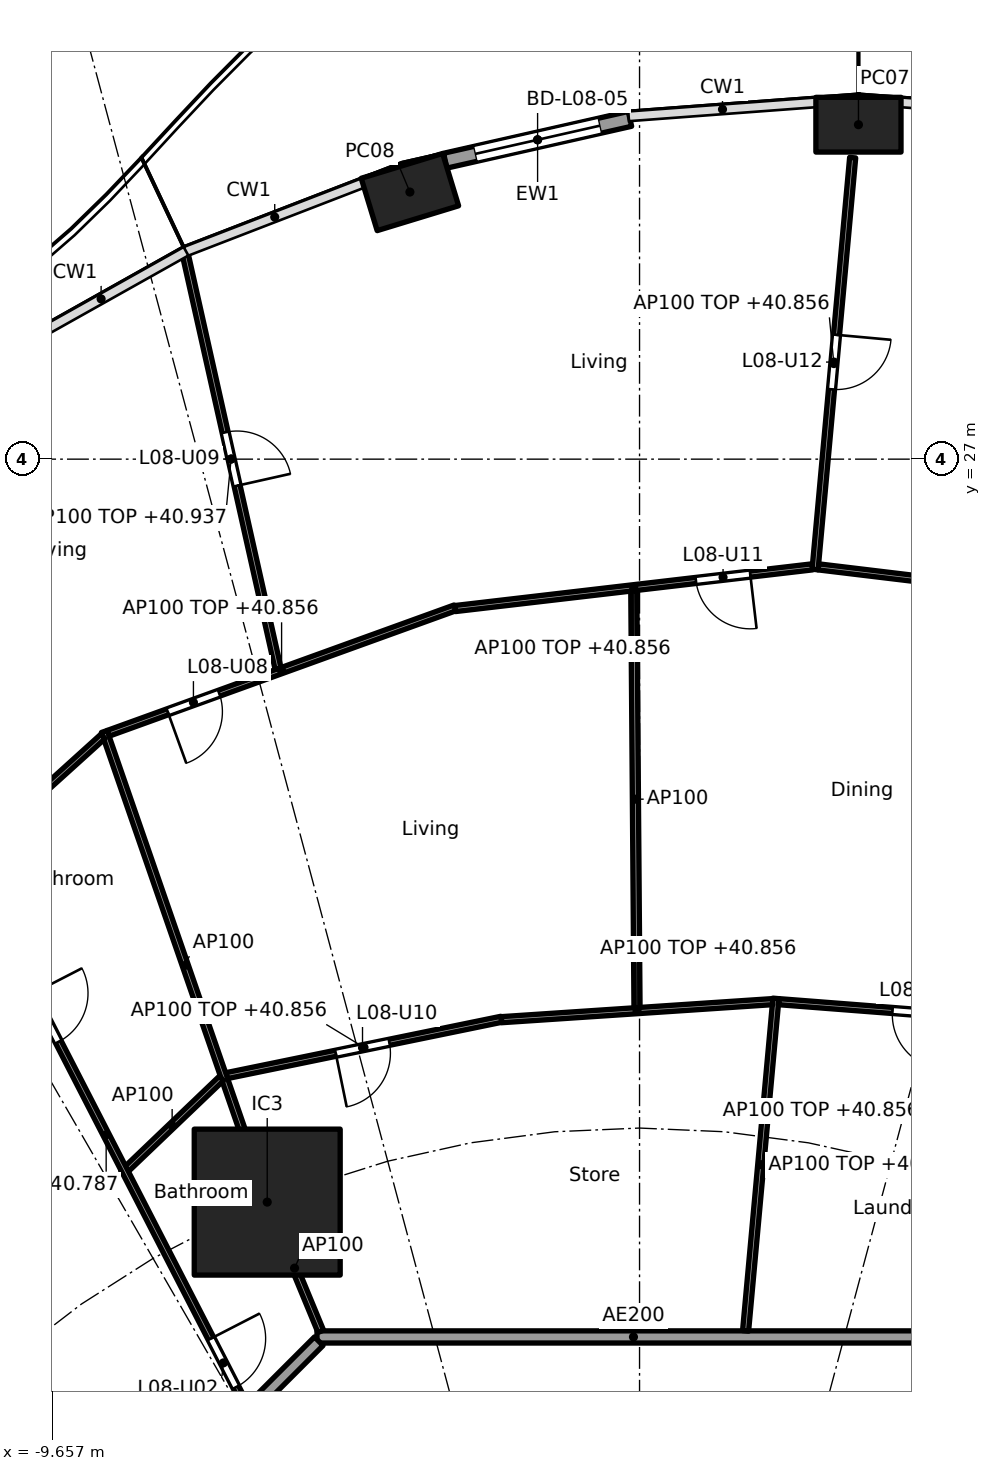
"""IFC4 building model, lengths in metres.
Left out: names, types, materials, properties, quantities, classifications, styles, units other than length and angle.
Written with IfcOpenShell. Run it as: python <this file> out.ifc"""

import sys

from ifc_helpers import new_model, si_unit, direction, frame, frame_2d, origin, origin_2d, place, context, subcontext, project, spatial, rectangle, hollow_rectangle, extrude, element, fill, save


model = new_model("IFC4")
c1 = context("Model", 3, precision=1e-05, world=origin(), true_north=direction((0.0, 1.0)))
c2 = subcontext(c1, "Body", "Model", "MODEL_VIEW")
j1 = project(units=[si_unit("LENGTHUNIT", "METRE"), si_unit("PLANEANGLEUNIT", "RADIAN")], contexts=[c1])
p1 = place(None, origin())
s1 = spatial("IfcSite", under=j1, at=p1, CompositionType="ELEMENT")
p2 = place(p1, origin())
s2 = spatial("IfcBuilding", under=s1, at=p2, CompositionType="ELEMENT")
p3 = place(p2, frame((0.0, 0.0, 38.1)))
s3 = spatial("IfcBuildingStorey", under=s2, at=p3, CompositionType="ELEMENT", Elevation=38.1)
for number, where, z_axis, x_axis in (
    (1, (3.6, 32.5, 0.0), (0.0, 0.0, 1.0), (-1.0, 0.0, 0.0)),
    (2, (-3.776, 31.393, 0.0), (0.0, 0.0, 1.0), (-0.957, -0.292, 0.0)),
):
    element("IfcColumn", number, at=place(p3, frame(where, z_axis=z_axis, x_axis=x_axis)), inside=s3, PredefinedType="COLUMN", context=c2, shape_type="SweptSolid", body=[
        extrude(hollow_rectangle(XDim=1.4, YDim=0.9, WallThickness=0.05, at=origin_2d()), origin(), (0.0, 0.0, 1.0), 3.7),
    ])
p4 = place(p3, frame((-6.123, 14.782, 0.0), z_axis=(0.0, 0.0, 1.0), x_axis=(1.0, 0.0, 0.0)))
e3 = element("IfcColumn", 3, at=p4, inside=s3, PredefinedType="COLUMN", context=c2, shape_type="SweptSolid", body=[
    extrude(rectangle(XDim=2.4, YDim=2.4, at=origin_2d()), origin(), (0.0, 0.0, 1.0), 3.7),
])
p5 = place(p3, frame((-3.195, 31.908, 0.0), z_axis=(0.0, 0.0, 1.0), x_axis=(0.975331134677, 0.220746863466, 0.0)))
e4 = element("IfcWall", 4, at=p5, inside=s3, PredefinedType="SOLIDWALL", context=c2, shape_type="SweptSolid", body=[
    extrude(rectangle(XDim=3.115, YDim=0.25, at=frame_2d((1.557, 0.0))), origin(), (0.0, 0.0, 1.0), 3.44),
])
p6 = place(p5, frame((0.507, 0.0, 0.0)))
e5 = element("IfcOpeningElement", 5, at=p6, cuts=e4, PredefinedType="OPENING", context=c2, shape_type="SweptSolid", body=[
    extrude(rectangle(XDim=2.1, YDim=2.4, at=frame_2d((1.05, 1.2))), frame((0.0, 0.135, 0.0), z_axis=(0.0, -1.0, 0.0), x_axis=(1.0, 0.0, 0.0)), (0.0, 0.0, 1.0), 0.27),
])
p7 = place(p3, frame((5.104, 12.565, 0.0), z_axis=(0.0, 0.0, 1.0), x_axis=(-1.0, 0.0, 0.0)))
e6 = element("IfcWall", 6, at=p7, inside=s3, PredefinedType="PARTITIONING", context=c2, shape_type="SweptSolid", body=[
    extrude(rectangle(XDim=10.409, YDim=0.2, at=frame_2d((5.205, 0.0))), origin(), (0.0, 0.0, 1.0), 3.44),
])
p8 = place(p3, frame((-5.275, 12.494, 0.0), z_axis=(0.0, 0.0, 1.0), x_axis=(-0.707106781187, -0.707106781187, 0.0)))
e7 = element("IfcWall", 7, at=p8, inside=s3, PredefinedType="PARTITIONING", context=c2, shape_type="SweptSolid", body=[
    extrude(rectangle(XDim=10.209, YDim=0.2, at=frame_2d((5.104, 0.0))), origin(), (0.0, 0.0, 1.0), 3.44),
])
p9 = place(p8, frame((2.87, 0.0, 0.0)))
e8 = element("IfcOpeningElement", 8, at=p9, cuts=e7, PredefinedType="OPENING", context=c2, shape_type="SweptSolid", body=[
    extrude(rectangle(XDim=1.0, YDim=2.1, at=frame_2d((0.5, 1.05))), frame((0.0, 0.11, 0.0), z_axis=(0.0, -1.0, 0.0), x_axis=(1.0, 0.0, 0.0)), (0.0, 0.0, 1.0), 0.22),
])
p10 = place(p3, frame((6.928, 17.719, 0.0), z_axis=(0.0, 0.0, 1.0), x_axis=(-0.997017959142, 0.077169872028, 0.0)))
e9 = element("IfcWall", 9, at=p10, inside=s3, PredefinedType="PARTITIONING", context=c2, shape_type="SweptSolid", body=[
    extrude(rectangle(XDim=4.654, YDim=0.1, at=frame_2d((2.327, 0.0))), origin(), (0.0, 0.0, 1.0), 2.756),
])
p11 = place(p10, frame((1.877, 0.0, 0.0)))
e10 = element("IfcOpeningElement", 10, at=p11, cuts=e9, PredefinedType="OPENING", context=c2, shape_type="SweptSolid", body=[
    extrude(rectangle(XDim=0.9, YDim=2.1, at=frame_2d((0.45, 1.05))), frame((0.0, 0.06, 0.0), z_axis=(0.0, -1.0, 0.0), x_axis=(1.0, 0.0, 0.0)), (0.0, 0.0, 1.0), 0.12),
])
p12 = place(p3, frame((8.907, 24.51, 0.0), z_axis=(0.0, 0.0, 1.0), x_axis=(-0.992836798252, 0.119478416615, 0.0)))
e11 = element("IfcWall", 11, at=p12, inside=s3, PredefinedType="PARTITIONING", context=c2, shape_type="SweptSolid", body=[
    extrude(rectangle(XDim=6.01, YDim=0.1, at=frame_2d((3.005, 0.0))), origin(), (0.0, 0.0, 1.0), 2.756),
])
p13 = place(p3, frame((1.744, 12.664, 0.0), z_axis=(0.0, 0.0, 1.0), x_axis=(0.090888552747, 0.995861070119, 0.0)))
e12 = element("IfcWall", 12, at=p13, inside=s3, PredefinedType="PARTITIONING", context=c2, shape_type="SweptSolid", body=[
    extrude(rectangle(XDim=5.49, YDim=0.1, at=frame_2d((2.745, 0.0))), origin(), (0.0, 0.0, 1.0), 2.687),
])
p14 = place(p3, frame((2.188, 18.079, 0.0), z_axis=(0.0, 0.0, 1.0), x_axis=(-0.997791437766, -0.066424744789, 0.0)))
e13 = element("IfcWall", 13, at=p14, inside=s3, PredefinedType="PARTITIONING", context=c2, shape_type="SweptSolid", body=[
    extrude(rectangle(XDim=4.469, YDim=0.1, at=frame_2d((2.235, 0.0))), origin(), (0.0, 0.0, 1.0), 2.756),
])
p15 = place(p3, frame((2.887, 25.185, 0.0), z_axis=(0.0, 0.0, 1.0), x_axis=(0.090885272046, 0.995861369531, 0.0)))
e14 = element("IfcWall", 14, at=p15, inside=s3, PredefinedType="PARTITIONING", context=c2, shape_type="SweptSolid", body=[
    extrude(rectangle(XDim=6.802, YDim=0.1, at=frame_2d((3.401, 0.0))), origin(), (0.0, 0.0, 1.0), 2.756),
])
p16 = place(p15, frame((2.976, 0.0, 0.0)))
e15 = element("IfcOpeningElement", 15, at=p16, cuts=e14, PredefinedType="OPENING", context=c2, shape_type="SweptSolid", body=[
    extrude(rectangle(XDim=0.9, YDim=2.1, at=frame_2d((0.45, 1.05))), frame((0.0, 0.06, 0.0), z_axis=(0.0, -1.0, 0.0), x_axis=(1.0, 0.0, 0.0)), (0.0, 0.0, 1.0), 0.12),
])
p17 = place(p3, frame((2.842, 25.229, 0.0), z_axis=(0.0, 0.0, 1.0), x_axis=(-0.993255612046, -0.115945198862, 0.0)))
e16 = element("IfcWall", 16, at=p17, inside=s3, PredefinedType="PARTITIONING", context=c2, shape_type="SweptSolid", body=[
    extrude(rectangle(XDim=5.913, YDim=0.1, at=frame_2d((2.956, 0.0))), origin(), (0.0, 0.0, 1.0), 2.756),
])
p18 = place(p17, frame((1.028, 0.0, 0.0)))
e17 = element("IfcOpeningElement", 17, at=p18, cuts=e16, PredefinedType="OPENING", context=c2, shape_type="SweptSolid", body=[
    extrude(rectangle(XDim=0.9, YDim=2.1, at=frame_2d((0.45, 1.05))), frame((0.0, 0.06, 0.0), z_axis=(0.0, -1.0, 0.0), x_axis=(1.0, 0.0, 0.0)), (0.0, 0.0, 1.0), 0.12),
])
p19 = place(p3, frame((-0.042, 17.98, 0.0), z_axis=(0.0, 0.0, 1.0), x_axis=(-0.007692080119, 0.999970415514, 0.0)))
e18 = element("IfcWall", 18, at=p19, inside=s3, PredefinedType="PARTITIONING", context=c2, shape_type="SweptSolid", body=[
    extrude(rectangle(XDim=6.856, YDim=0.1, at=frame_2d((3.428, 0.0))), origin(), (0.0, 0.0, 1.0), 3.44),
])
p20 = place(p3, frame((-2.272, 17.789, 0.0), z_axis=(0.0, 0.0, 1.0), x_axis=(-0.979587203416, -0.2010196779, 0.0)))
e19 = element("IfcWall", 19, at=p20, inside=s3, PredefinedType="PARTITIONING", context=c2, shape_type="SweptSolid", body=[
    extrude(rectangle(XDim=4.613, YDim=0.1, at=frame_2d((2.306, 0.0))), origin(), (0.0, 0.0, 1.0), 2.756),
])
p21 = place(p20, frame((1.881, 0.0, 0.0)))
e20 = element("IfcOpeningElement", 20, at=p21, cuts=e19, PredefinedType="OPENING", context=c2, shape_type="SweptSolid", body=[
    extrude(rectangle(XDim=0.9, YDim=2.1, at=frame_2d((0.45, 1.05))), frame((0.0, 0.06, 0.0), z_axis=(0.0, -1.0, 0.0), x_axis=(1.0, 0.0, 0.0)), (0.0, 0.0, 1.0), 0.12),
])
p22 = place(p3, frame((-3.034, 24.554, 0.0), z_axis=(0.0, 0.0, 1.0), x_axis=(-0.940401691072, -0.340065669288, 0.0)))
e21 = element("IfcWall", 21, at=p22, inside=s3, PredefinedType="PARTITIONING", context=c2, shape_type="SweptSolid", body=[
    extrude(rectangle(XDim=6.067, YDim=0.1, at=frame_2d((3.034, 0.0))), origin(), (0.0, 0.0, 1.0), 2.756),
])
p23 = place(p22, frame((4.125, 0.0, 0.0)))
e22 = element("IfcOpeningElement", 22, at=p23, cuts=e21, PredefinedType="OPENING", context=c2, shape_type="SweptSolid", body=[
    extrude(rectangle(XDim=0.9, YDim=2.1, at=frame_2d((0.45, 1.05))), frame((0.0, 0.06, 0.0), z_axis=(0.0, -1.0, 0.0), x_axis=(1.0, 0.0, 0.0)), (0.0, 0.0, 1.0), 0.12),
])
p24 = place(p3, frame((-5.945, 23.555, 0.0), z_axis=(0.0, 0.0, 1.0), x_axis=(-0.218598565433, 0.975814873421, 0.0)))
e23 = element("IfcWall", 23, at=p24, inside=s3, PredefinedType="PARTITIONING", context=c2, shape_type="SweptSolid", body=[
    extrude(rectangle(XDim=7.065, YDim=0.1, at=frame_2d((3.533, 0.0))), origin(), (0.0, 0.0, 1.0), 2.837),
])
p25 = place(p24, frame((3.083, 0.0, 0.0)))
e24 = element("IfcOpeningElement", 24, at=p25, cuts=e23, PredefinedType="OPENING", context=c2, shape_type="SweptSolid", body=[
    extrude(rectangle(XDim=0.9, YDim=2.1, at=frame_2d((0.45, 1.05))), frame((0.0, 0.06, 0.0), z_axis=(0.0, -1.0, 0.0), x_axis=(1.0, 0.0, 0.0)), (0.0, 0.0, 1.0), 0.12),
])
p26 = place(p3, frame((-5.243, 12.657, 0.0), z_axis=(0.0, 0.0, 1.0), x_axis=(-0.382719158442, 0.923864733477, 0.0)))
e25 = element("IfcWall", 25, at=p26, inside=s3, PredefinedType="PARTITIONING", context=c2, shape_type="SweptSolid", body=[
    extrude(rectangle(XDim=2.25, YDim=0.1, at=frame_2d((1.125, 0.0))), origin(), (0.0, 0.0, 1.0), 3.44),
])
p27 = place(p3, frame((-6.139, 14.829, 0.0), z_axis=(0.0, 0.0, 1.0), x_axis=(-0.327183700812, 0.944960753642, 0.0)))
e26 = element("IfcWall", 26, at=p27, inside=s3, PredefinedType="PARTITIONING", context=c2, shape_type="SweptSolid", body=[
    extrude(rectangle(XDim=8.14, YDim=0.1, at=frame_2d((4.07, 0.0))), origin(), (0.0, 0.0, 1.0), 3.44),
])
p28 = place(p3, frame((-6.876, 16.817, 0.0), z_axis=(0.0, 0.0, 1.0), x_axis=(-0.722762371977, -0.691096631199, 0.0)))
e27 = element("IfcWall", 27, at=p28, inside=s3, PredefinedType="PARTITIONING", context=c2, shape_type="SweptSolid", body=[
    extrude(rectangle(XDim=2.244, YDim=0.1, at=frame_2d((1.122, 0.0))), origin(), (0.0, 0.0, 1.0), 3.44),
])
p29 = place(p3, frame((-8.823, 22.441, 0.0), z_axis=(0.0, 0.0, 1.0), x_axis=(-0.741722263338, -0.670707152242, 0.0)))
e28 = element("IfcWall", 28, at=p29, inside=s3, PredefinedType="PARTITIONING", context=c2, shape_type="SweptSolid", body=[
    extrude(rectangle(XDim=6.109, YDim=0.1, at=frame_2d((3.055, 0.0))), origin(), (0.0, 0.0, 1.0), 2.756),
])
p30 = place(p3, frame((-6.477, 11.427, 0.0), z_axis=(0.0, 0.0, 1.0), x_axis=(-0.457464037982, 0.889228122561, 0.0)))
e29 = element("IfcWall", 29, at=p30, inside=s3, PredefinedType="PARTITIONING", context=c2, shape_type="SweptSolid", body=[
    extrude(rectangle(XDim=10.032, YDim=0.1, at=frame_2d((5.016, 0.0))), origin(), (0.0, 0.0, 1.0), 2.687),
])
p31 = place(p30, frame((0.35, 0.0, 0.0)))
e30 = element("IfcOpeningElement", 30, at=p31, cuts=e29, PredefinedType="OPENING", context=c2, shape_type="SweptSolid", body=[
    extrude(rectangle(XDim=0.9, YDim=2.1, at=frame_2d((0.45, 1.05))), frame((0.0, 0.06, 0.0), z_axis=(0.0, -1.0, 0.0), x_axis=(1.0, 0.0, 0.0)), (0.0, 0.0, 1.0), 0.12),
])
p32 = place(p30, frame((6.735, 0.0, 0.0)))
e31 = element("IfcOpeningElement", 31, at=p32, cuts=e29, PredefinedType="OPENING", context=c2, shape_type="SweptSolid", body=[
    extrude(rectangle(XDim=0.9, YDim=2.1, at=frame_2d((0.45, 1.05))), frame((0.0, 0.06, 0.0), z_axis=(0.0, -1.0, 0.0), x_axis=(1.0, 0.0, 0.0)), (0.0, 0.0, 1.0), 0.12),
])
p33 = place(p3, frame((-8.953, 8.958, 0.0), z_axis=(0.0, 0.0, 1.0), x_axis=(-0.684574307023, 0.728943082939, 0.0)))
e32 = element("IfcWall", 32, at=p33, inside=s3, PredefinedType="PARTITIONING", context=c2, shape_type="SweptSolid", body=[
    extrude(rectangle(XDim=15.231, YDim=0.1, at=frame_2d((7.615, 0.0))), origin(), (0.0, 0.0, 1.0), 2.687),
])
p34 = place(p33, frame((1.54, 0.0, 0.0)))
e33 = element("IfcOpeningElement", 33, at=p34, cuts=e32, PredefinedType="OPENING", context=c2, shape_type="SweptSolid", body=[
    extrude(rectangle(XDim=0.9, YDim=2.1, at=frame_2d((0.45, 1.05))), frame((0.0, 0.06, 0.0), z_axis=(0.0, -1.0, 0.0), x_axis=(1.0, 0.0, 0.0)), (0.0, 0.0, 1.0), 0.12),
])
p35 = place(p33, frame((6.174, 0.0, 0.0)))
e34 = element("IfcOpeningElement", 34, at=p35, cuts=e32, PredefinedType="OPENING", context=c2, shape_type="SweptSolid", body=[
    extrude(rectangle(XDim=0.9, YDim=2.1, at=frame_2d((0.45, 1.05))), frame((0.0, 0.06, 0.0), z_axis=(0.0, -1.0, 0.0), x_axis=(1.0, 0.0, 0.0)), (0.0, 0.0, 1.0), 0.12),
])
p36 = place(p33, frame((11.8, 0.0, 0.0)))
e35 = element("IfcOpeningElement", 35, at=p36, cuts=e32, PredefinedType="OPENING", context=c2, shape_type="SweptSolid", body=[
    extrude(rectangle(XDim=0.9, YDim=2.1, at=frame_2d((0.45, 1.05))), frame((0.0, 0.06, 0.0), z_axis=(0.0, -1.0, 0.0), x_axis=(1.0, 0.0, 0.0)), (0.0, 0.0, 1.0), 0.12),
])
p37 = place(p6, origin())
e36 = element("IfcDoor", 36, at=p37, inside=s3, OperationType="SLIDING_TO_LEFT", PredefinedType="DOOR", context=c2, shape_type="SweptSolid", body=[
    extrude(rectangle(XDim=2.1, YDim=2.4, at=frame_2d((1.05, 1.2))), frame((0.0, 0.025, 0.0), z_axis=(0.0, -1.0, 0.0), x_axis=(1.0, 0.0, 0.0)), (0.0, 0.0, 1.0), 0.05),
])
fill(e5, e36)
p38 = place(p31, frame((0.9, 0.0, 0.0), x_axis=(-1.0, 0.0, 0.0)))
e37 = element("IfcDoor", 37, at=p38, inside=s3, OperationType="SINGLE_SWING_LEFT", PredefinedType="DOOR", context=c2, shape_type="SweptSolid", body=[
    extrude(rectangle(XDim=0.9, YDim=2.1, at=frame_2d((0.45, 1.05))), frame((0.0, 0.025, 0.0), z_axis=(0.0, -1.0, 0.0), x_axis=(1.0, 0.0, 0.0)), (0.0, 0.0, 1.0), 0.05),
])
fill(e30, e37)
p39 = place(p32, frame((0.9, 0.0, 0.0), x_axis=(-1.0, 0.0, 0.0)))
e38 = element("IfcDoor", 38, at=p39, inside=s3, OperationType="SINGLE_SWING_LEFT", PredefinedType="DOOR", context=c2, shape_type="SweptSolid", body=[
    extrude(rectangle(XDim=0.9, YDim=2.1, at=frame_2d((0.45, 1.05))), frame((0.0, 0.025, 0.0), z_axis=(0.0, -1.0, 0.0), x_axis=(1.0, 0.0, 0.0)), (0.0, 0.0, 1.0), 0.05),
])
fill(e31, e38)
p40 = place(p23, origin())
e39 = element("IfcDoor", 39, at=p40, inside=s3, OperationType="SINGLE_SWING_RIGHT", PredefinedType="DOOR", context=c2, shape_type="SweptSolid", body=[
    extrude(rectangle(XDim=0.9, YDim=2.1, at=frame_2d((0.45, 1.05))), frame((0.0, 0.025, 0.0), z_axis=(0.0, -1.0, 0.0), x_axis=(1.0, 0.0, 0.0)), (0.0, 0.0, 1.0), 0.05),
])
fill(e22, e39)
p41 = place(p25, frame((0.9, 0.0, 0.0), x_axis=(-1.0, 0.0, 0.0)))
e40 = element("IfcDoor", 40, at=p41, inside=s3, OperationType="SINGLE_SWING_RIGHT", PredefinedType="DOOR", context=c2, shape_type="SweptSolid", body=[
    extrude(rectangle(XDim=0.9, YDim=2.1, at=frame_2d((0.45, 1.05))), frame((0.0, 0.025, 0.0), z_axis=(0.0, -1.0, 0.0), x_axis=(1.0, 0.0, 0.0)), (0.0, 0.0, 1.0), 0.05),
])
fill(e24, e40)
p42 = place(p21, origin())
e41 = element("IfcDoor", 41, at=p42, inside=s3, OperationType="SINGLE_SWING_RIGHT", PredefinedType="DOOR", context=c2, shape_type="SweptSolid", body=[
    extrude(rectangle(XDim=0.9, YDim=2.1, at=frame_2d((0.45, 1.05))), frame((0.0, 0.025, 0.0), z_axis=(0.0, -1.0, 0.0), x_axis=(1.0, 0.0, 0.0)), (0.0, 0.0, 1.0), 0.05),
])
fill(e20, e41)
p43 = place(p18, origin())
e42 = element("IfcDoor", 42, at=p43, inside=s3, OperationType="SINGLE_SWING_LEFT", PredefinedType="DOOR", context=c2, shape_type="SweptSolid", body=[
    extrude(rectangle(XDim=0.9, YDim=2.1, at=frame_2d((0.45, 1.05))), frame((0.0, 0.025, 0.0), z_axis=(0.0, -1.0, 0.0), x_axis=(1.0, 0.0, 0.0)), (0.0, 0.0, 1.0), 0.05),
])
fill(e17, e42)
p44 = place(p16, frame((0.9, 0.0, 0.0), x_axis=(-1.0, 0.0, 0.0)))
e43 = element("IfcDoor", 43, at=p44, inside=s3, OperationType="SINGLE_SWING_LEFT", PredefinedType="DOOR", context=c2, shape_type="SweptSolid", body=[
    extrude(rectangle(XDim=0.9, YDim=2.1, at=frame_2d((0.45, 1.05))), frame((0.0, 0.025, 0.0), z_axis=(0.0, -1.0, 0.0), x_axis=(1.0, 0.0, 0.0)), (0.0, 0.0, 1.0), 0.05),
])
fill(e15, e43)
p45 = place(p11, origin())
e44 = element("IfcDoor", 44, at=p45, inside=s3, OperationType="SINGLE_SWING_LEFT", PredefinedType="DOOR", context=c2, shape_type="SweptSolid", body=[
    extrude(rectangle(XDim=0.9, YDim=2.1, at=frame_2d((0.45, 1.05))), frame((0.0, 0.025, 0.0), z_axis=(0.0, -1.0, 0.0), x_axis=(1.0, 0.0, 0.0)), (0.0, 0.0, 1.0), 0.05),
])
fill(e10, e44)
save(model, sys.argv[1])
